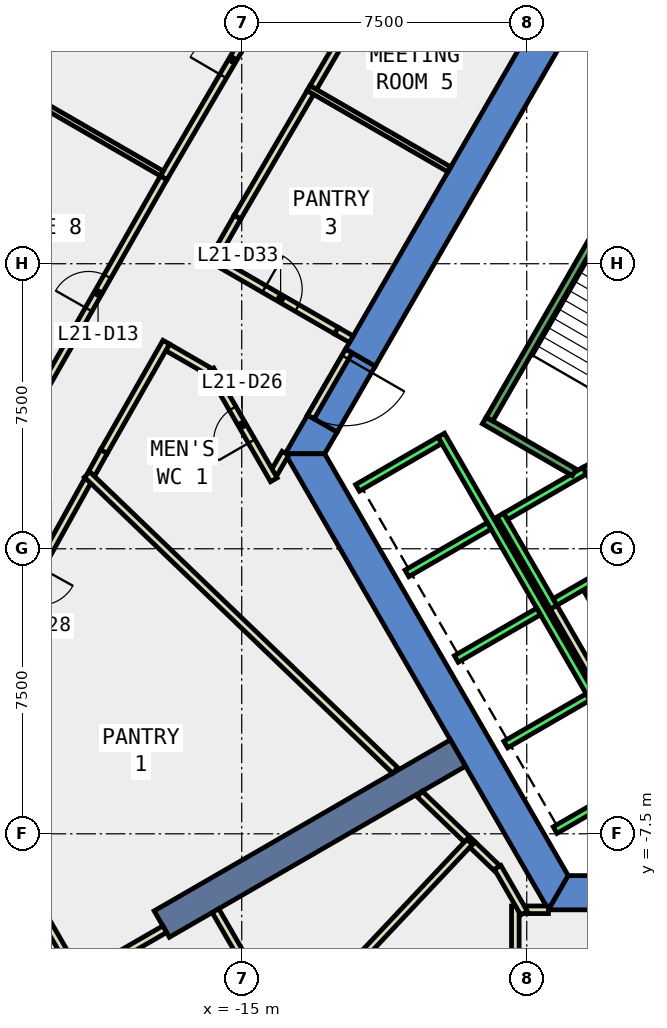
"""IFC4 building model, lengths in metres.
Left out: names, types, materials, properties, quantities, classifications, styles, units other than length and angle.
Written with IfcOpenShell. Run it as: python <this file> out.ifc"""

import sys

from ifc_helpers import new_model, si_unit, direction, frame, frame_2d, origin, place, context, subcontext, project, spatial, polyline, rectangle, outline, extrude, element, fill, save


model = new_model("IFC4")
c1 = context("Model", 3, precision=1e-05, world=origin(), true_north=direction((0.0, 1.0)))
c2 = subcontext(c1, "Body", "Model", "MODEL_VIEW")
j1 = project(units=[si_unit("LENGTHUNIT", "METRE"), si_unit("PLANEANGLEUNIT", "RADIAN")], contexts=[c1])
p1 = place(None, origin())
s1 = spatial("IfcSite", under=j1, at=p1, CompositionType="ELEMENT")
p2 = place(p1, origin())
s2 = spatial("IfcBuilding", under=s1, at=p2, CompositionType="ELEMENT")
p3 = place(p2, frame((0.0, 0.0, 99.2)))
s3 = spatial("IfcBuildingStorey", under=s2, at=p3, CompositionType="ELEMENT", Elevation=99.2)
p4 = place(p3, frame((0.0, 0.0, -0.4)))
e1 = element("IfcWall", 1, at=p4, inside=s3, PredefinedType="SHEAR", context=c2, shape_type="SweptSolid", body=[
    extrude(outline(polyline([(-12.267, 5.252), (-11.488, 4.802), (-6.409, 13.6), (-6.928, 14.5), (-12.267, 5.252)])), origin(), (0.0, 0.0, 1.0), 4.2),
])
p5 = place(p3, frame((0.0, 0.0, -0.4)))
e2 = element("IfcWall", 2, at=p5, inside=s3, PredefinedType="SHEAR", context=c2, shape_type="SweptSolid", body=[
    extrude(outline(polyline([(-12.488, 3.07), (-13.267, 3.52), (-13.856, 2.5), (-12.817, 2.5), (-12.488, 3.07)])), origin(), (0.0, 0.0, 1.0), 4.2),
])
p6 = place(p3, frame((0.0, 0.0, 3.6)))
e3 = element("IfcWall", 3, at=p6, inside=s3, PredefinedType="SHEAR", context=c2, shape_type="SweptSolid", body=[
    extrude(outline(polyline([(-13.267, 3.52), (-12.488, 3.07), (-11.488, 4.802), (-12.267, 5.252), (-13.267, 3.52)])), origin(), (0.0, 0.0, 1.0), 0.2),
])
p7 = place(p3, frame((0.0, 0.0, -0.4)))
e4 = element("IfcWall", 4, at=p7, inside=s3, PredefinedType="SHEAR", context=c2, shape_type="SweptSolid", body=[
    extrude(outline(polyline([(-13.856, 2.5), (-6.928, -9.5), (-6.409, -8.6), (-12.817, 2.5), (-13.856, 2.5)])), origin(), (0.0, 0.0, 1.0), 4.2),
])
p8 = place(p3, frame((0.0, 0.0, -0.4)))
e5 = element("IfcWall", 5, at=p8, inside=s3, PredefinedType="SHEAR", context=c2, shape_type="SweptSolid", body=[
    extrude(outline(polyline([(3.75, -9.5), (3.75, -8.6), (-6.409, -8.6), (-6.928, -9.5), (3.75, -9.5)])), origin(), (0.0, 0.0, 1.0), 4.2),
])
p9 = place(p3, frame((-9.31, -5.375, -0.4), z_axis=(0.0, 0.0, 1.0), x_axis=(-0.866017533419, -0.500013631625, 0.0)))
e6 = element("IfcWall", 6, at=p9, inside=s3, PredefinedType="SHEAR", context=c2, shape_type="SweptSolid", body=[
    extrude(rectangle(XDim=9.0, YDim=0.8, at=frame_2d((4.5, 0.0))), origin(), (0.0, 0.0, 1.0), 4.2),
])
p10 = place(p3, frame((-11.814, 14.364, 0.0), z_axis=(0.0, 0.0, 1.0), x_axis=(-0.504658640018, -0.863318977583, 0.0)))
e7 = element("IfcWall", 7, at=p10, inside=s3, PredefinedType="PARTITIONING", context=c2, shape_type="SweptSolid", body=[
    extrude(rectangle(XDim=2.582, YDim=0.2, at=frame_2d((1.291, 0.0))), origin(), (0.0, 0.0, 1.0), 3.8),
])
p11 = place(p3, frame((-13.193, 12.005, 0.0), z_axis=(0.0, 0.0, 1.0), x_axis=(-0.50499711829, -0.863121028894, 0.0)))
e8 = element("IfcWall", 8, at=p11, inside=s3, PredefinedType="PARTITIONING", context=c2, shape_type="SweptSolid", body=[
    extrude(rectangle(XDim=3.8, YDim=0.2, at=frame_2d((1.9, 0.0))), origin(), (0.0, 0.0, 1.0), 3.8),
])
p12 = place(p3, frame((-15.112, 8.725, 0.0), z_axis=(0.0, 0.0, 1.0), x_axis=(-0.495074026382, -0.868850797549, 0.0)))
e9 = element("IfcWall", 9, at=p12, inside=s3, PredefinedType="PARTITIONING", context=c2, shape_type="SweptSolid", body=[
    extrude(rectangle(XDim=1.186, YDim=0.2, at=frame_2d((0.593, 0.0))), origin(), (0.0, 0.0, 1.0), 3.8),
])
p13 = place(p3, frame((-15.835, 7.658, 0.0), z_axis=(0.0, 0.0, 1.0), x_axis=(0.866076614194, -0.499911290476, 0.0)))
e10 = element("IfcWall", 10, at=p13, inside=s3, PredefinedType="PARTITIONING", context=c2, shape_type="SweptSolid", body=[
    extrude(rectangle(XDim=3.843, YDim=0.2, at=frame_2d((1.921, 0.0))), origin(), (0.0, 0.0, 1.0), 3.8),
])
p14 = place(p13, frame((1.646, 0.0, 0.0)))
e11 = element("IfcOpeningElement", 11, at=p14, cuts=e10, PredefinedType="OPENING", context=c2, shape_type="SweptSolid", body=[
    extrude(rectangle(XDim=1.0, YDim=2.1, at=frame_2d((0.5, 1.05))), frame((0.0, 0.11, 0.0), z_axis=(0.0, -1.0, 0.0), x_axis=(1.0, 0.0, 0.0)), (0.0, 0.0, 1.0), 0.22),
])
p15 = place(p3, frame((-13.85, 2.514, 0.0), z_axis=(0.0, 0.0, 1.0), x_axis=(-0.500418219013, -0.865783810244, 0.0)))
e12 = element("IfcWall", 12, at=p15, inside=s3, PredefinedType="PARTITIONING", context=c2, shape_type="SweptSolid", body=[
    extrude(rectangle(XDim=0.607, YDim=0.2, at=frame_2d((0.304, 0.0))), origin(), (0.0, 0.0, 1.0), 3.8),
])
p16 = place(p3, frame((-14.154, 1.815, 0.0), z_axis=(0.0, 0.0, 1.0), x_axis=(-0.500038857296, 0.866002968352, 0.0)))
e13 = element("IfcWall", 13, at=p16, inside=s3, PredefinedType="PARTITIONING", context=c2, shape_type="SweptSolid", body=[
    extrude(rectangle(XDim=3.34, YDim=0.2, at=frame_2d((1.67, 0.0))), origin(), (0.0, 0.0, 1.0), 3.8),
])
p17 = place(p16, frame((1.17, 0.0, 0.0)))
e14 = element("IfcOpeningElement", 14, at=p17, cuts=e13, PredefinedType="OPENING", context=c2, shape_type="SweptSolid", body=[
    extrude(rectangle(XDim=1.0, YDim=2.1, at=frame_2d((0.5, 1.05))), frame((0.0, 0.11, 0.0), z_axis=(0.0, -1.0, 0.0), x_axis=(1.0, 0.0, 0.0)), (0.0, 0.0, 1.0), 0.22),
])
p18 = place(p3, frame((-15.86, 4.671, 0.0), z_axis=(0.0, 0.0, 1.0), x_axis=(-0.866192052573, 0.49971124468, 0.0)))
e15 = element("IfcWall", 15, at=p18, inside=s3, PredefinedType="PARTITIONING", context=c2, shape_type="SweptSolid", body=[
    extrude(rectangle(XDim=1.257, YDim=0.2, at=frame_2d((0.628, 0.0))), origin(), (0.0, 0.0, 1.0), 3.8),
])
p19 = place(p3, frame((-16.986, 5.436, 0.0), z_axis=(0.0, 0.0, 1.0), x_axis=(-0.49514688151, -0.868809280412, 0.0)))
e16 = element("IfcWall", 16, at=p19, inside=s3, PredefinedType="PARTITIONING", context=c2, shape_type="SweptSolid", body=[
    extrude(rectangle(XDim=3.314, YDim=0.2, at=frame_2d((1.657, 0.0))), origin(), (0.0, 0.0, 1.0), 3.8),
])
p20 = place(p3, frame((-18.627, 2.557, 0.0), z_axis=(0.0, 0.0, 1.0), x_axis=(-0.484771582084, -0.874640790956, 0.0)))
e17 = element("IfcWall", 17, at=p20, inside=s3, PredefinedType="PARTITIONING", context=c2, shape_type="SweptSolid", body=[
    extrude(rectangle(XDim=0.666, YDim=0.2, at=frame_2d((0.333, 0.0))), origin(), (0.0, 0.0, 1.0), 3.8),
])
p21 = place(p3, frame((-19.047, 1.799, 0.0), z_axis=(0.0, 0.0, 1.0), x_axis=(-0.485240396382, -0.87438078531, 0.0)))
e18 = element("IfcWall", 18, at=p21, inside=s3, PredefinedType="PARTITIONING", context=c2, shape_type="SweptSolid", body=[
    extrude(rectangle(XDim=6.232, YDim=0.2, at=frame_2d((3.116, 0.0))), origin(), (0.0, 0.0, 1.0), 3.8),
])
p22 = place(p21, frame((2.616, 0.0, 0.0)))
e19 = element("IfcOpeningElement", 19, at=p22, cuts=e18, PredefinedType="OPENING", context=c2, shape_type="SweptSolid", body=[
    extrude(rectangle(XDim=1.0, YDim=2.1, at=frame_2d((0.5, 1.05))), frame((0.0, 0.11, 0.0), z_axis=(0.0, -1.0, 0.0), x_axis=(1.0, 0.0, 0.0)), (0.0, 0.0, 1.0), 0.22),
])
p23 = place(p3, frame((-17.055, 9.76, 0.0), z_axis=(0.0, 0.0, 1.0), x_axis=(0.504817517618, 0.863226085047, 0.0)))
e20 = element("IfcWall", 20, at=p23, inside=s3, PredefinedType="PARTITIONING", context=c2, shape_type="SweptSolid", body=[
    extrude(rectangle(XDim=7.199, YDim=0.2, at=frame_2d((3.599, 0.0))), origin(), (0.0, 0.0, 1.0), 3.8),
])
p24 = place(p23, frame((3.099, 0.0, 0.0)))
e21 = element("IfcOpeningElement", 21, at=p24, cuts=e20, PredefinedType="OPENING", context=c2, shape_type="SweptSolid", body=[
    extrude(rectangle(XDim=1.0, YDim=2.1, at=frame_2d((0.5, 1.05))), frame((0.0, 0.11, 0.0), z_axis=(0.0, -1.0, 0.0), x_axis=(1.0, 0.0, 0.0)), (0.0, 0.0, 1.0), 0.22),
])
p25 = place(p3, frame((-20.581, 3.571, 0.0), z_axis=(0.0, 0.0, 1.0), x_axis=(0.495138372197, 0.868814129937, 0.0)))
e22 = element("IfcWall", 22, at=p25, inside=s3, PredefinedType="PARTITIONING", context=c2, shape_type="SweptSolid", body=[
    extrude(rectangle(XDim=7.124, YDim=0.2, at=frame_2d((3.562, 0.0))), origin(), (0.0, 0.0, 1.0), 3.8),
])
p26 = place(p25, frame((3.137, 0.0, 0.0)))
e23 = element("IfcOpeningElement", 23, at=p26, cuts=e22, PredefinedType="OPENING", context=c2, shape_type="SweptSolid", body=[
    extrude(rectangle(XDim=1.0, YDim=2.1, at=frame_2d((0.5, 1.05))), frame((0.0, 0.11, 0.0), z_axis=(0.0, -1.0, 0.0), x_axis=(1.0, 0.0, 0.0)), (0.0, 0.0, 1.0), 0.22),
])
p27 = place(p3, frame((-5.126, -2.422, 0.0), z_axis=(0.0, 0.0, 1.0), x_axis=(-0.500062241894, 0.865989465428, 0.0)))
e24 = element("IfcWall", 24, at=p27, inside=s3, PredefinedType="PARTITIONING", context=c2, shape_type="SweptSolid", body=[
    extrude(rectangle(XDim=1.7, YDim=0.2, at=frame_2d((0.85, 0.0))), origin(), (0.0, 0.0, 1.0), 3.8),
])
p28 = place(p3, frame((-5.492, -3.788, 0.0), z_axis=(0.0, 0.0, 1.0), x_axis=(-0.500008949224, 0.866020236886, 0.0)))
e25 = element("IfcWall", 25, at=p28, inside=s3, PredefinedType="PARTITIONING", context=c2, shape_type="SweptSolid", body=[
    extrude(rectangle(XDim=2.68, YDim=0.2, at=frame_2d((1.34, 0.0))), origin(), (0.0, 0.0, 1.0), 3.8),
])
p29 = place(p3, frame((-9.537, 9.981, 0.0), z_axis=(0.0, 0.0, 1.0), x_axis=(-0.866007866579, 0.5000303741, 0.0)))
e26 = element("IfcWall", 26, at=p29, inside=s3, PredefinedType="PARTITIONING", context=c2, shape_type="SweptSolid", body=[
    extrude(rectangle(XDim=4.278, YDim=0.15, at=frame_2d((2.139, 0.0))), origin(), (0.0, 0.0, 1.0), 3.8),
])
p30 = place(p3, frame((-7.522, -9.499, 0.0), z_axis=(0.0, 0.0, 1.0), x_axis=(1.0, 0.0, 0.0)))
e27 = element("IfcWall", 27, at=p30, inside=s3, PredefinedType="PARTITIONING", context=c2, shape_type="SweptSolid", body=[
    extrude(rectangle(XDim=0.593, YDim=0.2, at=frame_2d((0.296, 0.0))), origin(), (0.0, 0.0, 1.0), 3.8),
])
p31 = place(p3, frame((-7.8, -17.765, 0.0), z_axis=(0.0, 0.0, 1.0), x_axis=(0.0, 1.0, 0.0)))
e28 = element("IfcWall", 28, at=p31, inside=s3, PredefinedType="PARTITIONING", context=c2, shape_type="SweptSolid", body=[
    extrude(rectangle(XDim=8.366, YDim=0.2, at=frame_2d((4.183, 0.0))), origin(), (0.0, 0.0, 1.0), 3.8),
])
p32 = place(p31, frame((3.683, 0.0, 0.0)))
e29 = element("IfcOpeningElement", 29, at=p32, cuts=e28, PredefinedType="OPENING", context=c2, shape_type="SweptSolid", body=[
    extrude(rectangle(XDim=1.0, YDim=2.1, at=frame_2d((0.5, 1.05))), frame((0.0, 0.11, 0.0), z_axis=(0.0, -1.0, 0.0), x_axis=(1.0, 0.0, 0.0)), (0.0, 0.0, 1.0), 0.22),
])
p33 = place(p3, frame((-8.93, -7.783, 0.0), z_axis=(0.0, 0.0, 1.0), x_axis=(0.720954255291, -0.692982656189, 0.0)))
e30 = element("IfcWall", 30, at=p33, inside=s3, PredefinedType="PARTITIONING", context=c2, shape_type="SweptSolid", body=[
    extrude(rectangle(XDim=0.89, YDim=0.2, at=frame_2d((0.445, 0.0))), origin(), (0.0, 0.0, 1.0), 3.8),
])
p34 = place(p3, frame((-7.572, -9.586, 0.0), z_axis=(0.0, 0.0, 1.0), x_axis=(-0.499484152563, 0.866323023669, 0.0)))
e31 = element("IfcWall", 31, at=p34, inside=s3, PredefinedType="PARTITIONING", context=c2, shape_type="SweptSolid", body=[
    extrude(rectangle(XDim=1.39, YDim=0.2, at=frame_2d((0.695, 0.0))), origin(), (0.0, 0.0, 1.0), 3.8),
])
p35 = place(p3, frame((-8.93, -7.783, 0.0), z_axis=(0.0, 0.0, 1.0), x_axis=(-0.72124523191, 0.692679807305, 0.0)))
e32 = element("IfcWall", 32, at=p35, inside=s3, PredefinedType="PARTITIONING", context=c2, shape_type="SweptSolid", body=[
    extrude(rectangle(XDim=1.923, YDim=0.2, at=frame_2d((0.961, 0.0))), origin(), (0.0, 0.0, 1.0), 3.8),
])
p36 = place(p3, frame((-13.865, -12.876, 0.0), z_axis=(0.0, 0.0, 1.0), x_axis=(0.685651384846, 0.727930064263, 0.0)))
e33 = element("IfcWall", 33, at=p36, inside=s3, PredefinedType="PARTITIONING", context=c2, shape_type="SweptSolid", body=[
    extrude(rectangle(XDim=7.091, YDim=0.2, at=frame_2d((3.545, 0.0))), origin(), (0.0, 0.0, 1.0), 3.8),
])
p37 = place(p3, frame((-13.847, -12.716, 0.0), z_axis=(0.0, 0.0, 1.0), x_axis=(-0.499861859587, 0.866105144501, 0.0)))
e34 = element("IfcWall", 34, at=p37, inside=s3, PredefinedType="PARTITIONING", context=c2, shape_type="SweptSolid", body=[
    extrude(rectangle(XDim=3.689, YDim=0.2, at=frame_2d((1.844, 0.0))), origin(), (0.0, 0.0, 1.0), 3.8),
])
p38 = place(p3, frame((-17.027, -10.009, 0.0), z_axis=(0.0, 0.0, 1.0), x_axis=(-0.865950948929, -0.500128937424, 0.0)))
e35 = element("IfcWall", 35, at=p38, inside=s3, PredefinedType="PARTITIONING", context=c2, shape_type="SweptSolid", body=[
    extrude(rectangle(XDim=2.599, YDim=0.2, at=frame_2d((1.3, 0.0))), origin(), (0.0, 0.0, 1.0), 3.8),
])
p39 = place(p3, frame((-19.278, -11.309, 0.0), z_axis=(0.0, 0.0, 1.0), x_axis=(-0.500044545065, 0.865999684151, 0.0)))
e36 = element("IfcWall", 36, at=p39, inside=s3, PredefinedType="PARTITIONING", context=c2, shape_type="SweptSolid", body=[
    extrude(rectangle(XDim=7.261, YDim=0.2, at=frame_2d((3.63, 0.0))), origin(), (0.0, 0.0, 1.0), 3.8),
])
p40 = place(p3, frame((-17.104, 9.875, 0.0), z_axis=(0.0, 0.0, 1.0), x_axis=(-0.866024640963, 0.500001321243, 0.0)))
e37 = element("IfcWall", 37, at=p40, inside=s3, PredefinedType="PARTITIONING", context=c2, shape_type="SweptSolid", body=[
    extrude(rectangle(XDim=5.33, YDim=0.15, at=frame_2d((2.665, 0.0))), origin(), (0.0, 0.0, 1.0), 3.8),
])
p41 = place(p3, frame((-12.18, 5.202, 0.0), z_axis=(0.0, 0.0, 1.0), x_axis=(-0.50002537861, -0.866010750942, 0.0)))
e38 = element("IfcWall", 38, at=p41, inside=s3, PredefinedType="PARTITIONING", context=c2, shape_type="SweptSolid", body=[
    extrude(rectangle(XDim=2.0, YDim=0.2, at=frame_2d((1.0, 0.0))), origin(), (0.0, 0.0, 1.0), 2.4),
])
p42 = place(p41, frame((0.19, 0.0, 0.0)))
e39 = element("IfcOpeningElement", 39, at=p42, cuts=e38, PredefinedType="OPENING", context=c2, shape_type="SweptSolid", body=[
    extrude(rectangle(XDim=1.8, YDim=2.1, at=frame_2d((0.9, 1.05))), frame((0.0, 0.11, 0.0), z_axis=(0.0, -1.0, 0.0), x_axis=(1.0, 0.0, 0.0)), (0.0, 0.0, 1.0), 0.22),
])
p43 = place(p3, frame((-10.96, -5.834, 0.0), z_axis=(0.0, 0.0, 1.0), x_axis=(-0.721236335428, 0.692689070549, 0.0)))
e40 = element("IfcWall", 40, at=p43, inside=s3, PredefinedType="PARTITIONING", context=c2, shape_type="SweptSolid", body=[
    extrude(rectangle(XDim=11.246, YDim=0.2, at=frame_2d((5.623, 0.0))), origin(), (0.0, 0.0, 1.0), 3.8),
])
p44 = place(p3, frame((-12.507, 5.737, 0.0), z_axis=(0.0, 0.0, 1.0), x_axis=(0.866167537795, -0.499753735824, 0.0)))
e41 = element("IfcWall", 41, at=p44, inside=s3, PredefinedType="PARTITIONING", context=c2, shape_type="SweptSolid", body=[
    extrude(rectangle(XDim=0.45, YDim=0.2, at=frame_2d((0.225, 0.0))), origin(), (0.0, 0.0, 1.0), 2.4),
])
p45 = place(p3, frame((-5.94, 2.188, 0.0), z_axis=(0.0, 0.0, 1.0), x_axis=(0.49994636267, -0.866056369097, 0.0)))
e42 = element("IfcWall", 42, at=p45, inside=s3, PredefinedType="STANDARD", context=c2, shape_type="SweptSolid", body=[
    extrude(rectangle(XDim=2.8, YDim=0.2, at=frame_2d((1.4, 0.0))), origin(), (0.0, 0.0, 1.0), 3.8),
])
p46 = place(p45, frame((1.225, 0.0, 0.0)))
e43 = element("IfcOpeningElement", 43, at=p46, cuts=e42, PredefinedType="OPENING", context=c2, shape_type="SweptSolid", body=[
    extrude(rectangle(XDim=1.1, YDim=2.1, at=frame_2d((0.55, 1.05))), frame((0.0, 0.11, 0.0), z_axis=(0.0, -1.0, 0.0), x_axis=(1.0, 0.0, 0.0)), (0.0, 0.0, 1.0), 0.22),
])
p47 = place(p3, frame((-8.192, 0.888, 0.0), z_axis=(0.0, 0.0, 1.0), x_axis=(0.49994636267, -0.866056369097, 0.0)))
e44 = element("IfcWall", 44, at=p47, inside=s3, PredefinedType="STANDARD", context=c2, shape_type="SweptSolid", body=[
    extrude(rectangle(XDim=2.8, YDim=0.2, at=frame_2d((1.4, 0.0))), origin(), (0.0, 0.0, 1.0), 3.8),
])
for number, where, z_axis, x_axis in (
    (45, (-5.977, 2.052, 0.0), (0.0, 0.0, 1.0), (-0.866, -0.5, 0.0)),
    (46, (-4.677, -0.2, 0.0), (0.0, 0.0, 1.0), (-0.866, -0.5, 0.0)),
):
    element("IfcWall", number, at=place(p3, frame(where, z_axis=z_axis, x_axis=x_axis)), inside=s3, PredefinedType="STANDARD", context=c2, shape_type="SweptSolid", body=[
        extrude(rectangle(XDim=2.399, YDim=0.2, at=frame_2d((1.2, 0.0))), origin(), (0.0, 0.0, 1.0), 3.8),
    ])
p48 = place(p3, frame((-9.751, 2.99, 0.0), z_axis=(0.0, 0.0, 1.0), x_axis=(0.50000090737, -0.866024879913, 0.0)))
e47 = element("IfcWall", 47, at=p48, inside=s3, PredefinedType="STANDARD", context=c2, shape_type="SweptSolid", body=[
    extrude(rectangle(XDim=10.6, YDim=0.2, at=frame_2d((5.3, 0.0))), origin(), (0.0, 0.0, 1.0), 3.8),
])
p49 = place(p3, frame((-9.788, 2.853, 0.0), z_axis=(0.0, 0.0, 1.0), x_axis=(-0.865998541277, -0.500046524342, 0.0)))
e48 = element("IfcWall", 48, at=p49, inside=s3, PredefinedType="STANDARD", context=c2, shape_type="SweptSolid", body=[
    extrude(rectangle(XDim=2.5, YDim=0.2, at=frame_2d((1.25, 0.0))), origin(), (0.0, 0.0, 1.0), 3.8),
])
for number, where, z_axis, x_axis in (
    (49, (-8.488, 0.602, 0.0), (0.0, 0.0, 1.0), (-0.866, -0.5, 0.0)),
    (50, (-7.188, -1.65, 0.0), (0.0, 0.0, 1.0), (-0.866, -0.5, 0.0)),
    (51, (-5.888, -3.902, 0.0), (0.0, 0.0, 1.0), (-0.866, -0.5, 0.0)),
    (52, (-4.588, -6.153, 0.0), (0.0, 0.0, 1.0), (-0.866, -0.5, 0.0)),
):
    element("IfcWall", number, at=place(p3, frame(where, z_axis=z_axis, x_axis=x_axis)), inside=s3, PredefinedType="STANDARD", context=c2, shape_type="SweptSolid", body=[
        extrude(rectangle(XDim=2.5, YDim=0.2, at=frame_2d((1.25, 0.0))), origin(), (0.0, 0.0, 1.0), 3.8),
    ])
p50 = place(p3, frame((-6.25, 2.01, 0.0), z_axis=(0.0, 0.0, 1.0), x_axis=(-0.86611865017, 0.499838457731, 0.0)))
e53 = element("IfcWall", 53, at=p50, inside=s3, PredefinedType="STANDARD", context=c2, shape_type="SweptSolid", body=[
    extrude(rectangle(XDim=2.733, YDim=0.2, at=frame_2d((1.366, 0.0))), origin(), (0.0, 0.0, 1.0), 3.8),
])
p51 = place(p3, frame((-5.03, 9.388, 0.0), z_axis=(0.0, 0.0, 1.0), x_axis=(-0.499978703459, -0.866037698999, 0.0)))
e54 = element("IfcWall", 54, at=p51, inside=s3, PredefinedType="STANDARD", context=c2, shape_type="SweptSolid", body=[
    extrude(rectangle(XDim=6.9, YDim=0.2, at=frame_2d((3.45, 0.0))), origin(), (0.0, 0.0, 1.0), 3.8),
])
p52 = place(p24, origin())
e55 = element("IfcDoor", 55, at=p52, inside=s3, OperationType="SINGLE_SWING_LEFT", PredefinedType="DOOR", context=c2, shape_type="SweptSolid", body=[
    extrude(rectangle(XDim=1.0, YDim=2.1, at=frame_2d((0.5, 1.05))), frame((0.0, 0.025, 0.0), z_axis=(0.0, -1.0, 0.0), x_axis=(1.0, 0.0, 0.0)), (0.0, 0.0, 1.0), 0.05),
])
fill(e21, e55)
p53 = place(p26, origin())
e56 = element("IfcDoor", 56, at=p53, inside=s3, OperationType="SINGLE_SWING_LEFT", PredefinedType="DOOR", context=c2, shape_type="SweptSolid", body=[
    extrude(rectangle(XDim=1.0, YDim=2.1, at=frame_2d((0.5, 1.05))), frame((0.0, 0.025, 0.0), z_axis=(0.0, -1.0, 0.0), x_axis=(1.0, 0.0, 0.0)), (0.0, 0.0, 1.0), 0.05),
])
fill(e23, e56)
p54 = place(p17, origin())
e57 = element("IfcDoor", 57, at=p54, inside=s3, OperationType="SINGLE_SWING_LEFT", PredefinedType="DOOR", context=c2, shape_type="SweptSolid", body=[
    extrude(rectangle(XDim=1.0, YDim=2.1, at=frame_2d((0.5, 1.05))), frame((0.0, 0.025, 0.0), z_axis=(0.0, -1.0, 0.0), x_axis=(1.0, 0.0, 0.0)), (0.0, 0.0, 1.0), 0.05),
])
fill(e14, e57)
p55 = place(p14, origin())
e58 = element("IfcDoor", 58, at=p55, inside=s3, OperationType="SINGLE_SWING_LEFT", PredefinedType="DOOR", context=c2, shape_type="SweptSolid", body=[
    extrude(rectangle(XDim=1.0, YDim=2.1, at=frame_2d((0.5, 1.05))), frame((0.0, 0.025, 0.0), z_axis=(0.0, -1.0, 0.0), x_axis=(1.0, 0.0, 0.0)), (0.0, 0.0, 1.0), 0.05),
])
fill(e11, e58)
p56 = place(p42, origin())
e59 = element("IfcDoor", 59, at=p56, inside=s3, OperationType="DOUBLE_DOOR_SINGLE_SWING", PredefinedType="DOOR", context=c2, shape_type="SweptSolid", body=[
    extrude(rectangle(XDim=1.8, YDim=2.1, at=frame_2d((0.9, 1.05))), frame((0.0, 0.025, 0.0), z_axis=(0.0, -1.0, 0.0), x_axis=(1.0, 0.0, 0.0)), (0.0, 0.0, 1.0), 0.05),
])
fill(e39, e59)
save(model, sys.argv[1])
